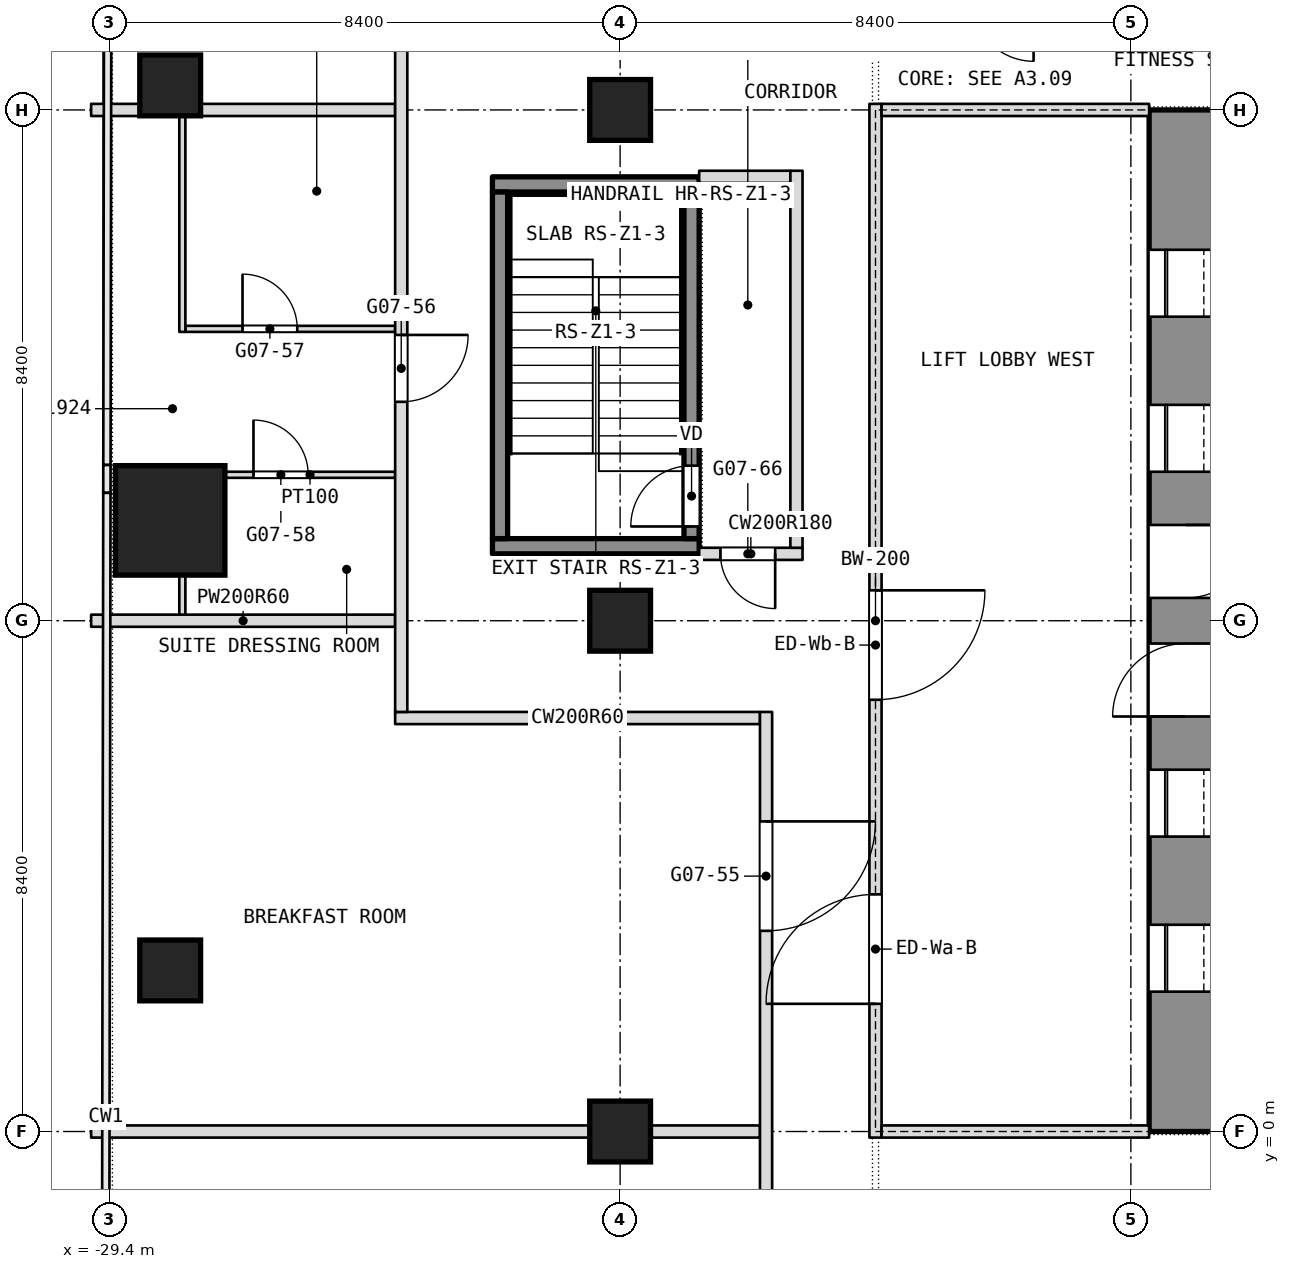
"""IFC4 building model, lengths in metres.
Left out: names, types, materials, properties, quantities, classifications, styles, units other than length and angle.
Written with IfcOpenShell. Run it as: python <this file> out.ifc"""

import sys

from ifc_helpers import new_model, si_unit, direction, frame, frame_2d, origin, origin_2d, place, context, subcontext, project, spatial, rectangle, extrude, element, fill, save


model = new_model("IFC4")
c1 = context("Model", 3, precision=1e-05, world=origin(), true_north=direction((0.0, 1.0)))
c2 = subcontext(c1, "Body", "Model", "MODEL_VIEW")
j1 = project(units=[si_unit("LENGTHUNIT", "METRE"), si_unit("PLANEANGLEUNIT", "RADIAN")], contexts=[c1])
p1 = place(None, origin())
s1 = spatial("IfcSite", under=j1, at=p1, CompositionType="ELEMENT")
p2 = place(p1, origin())
s2 = spatial("IfcBuilding", under=s1, at=p2, CompositionType="ELEMENT")
p3 = place(p2, frame((0.0, 0.0, 83.3)))
s3 = spatial("IfcBuildingStorey", under=s2, at=p3, CompositionType="ELEMENT", Elevation=83.3)
p4 = place(p3, frame((-11.7, 0.0, 0.0), z_axis=(0.0, 0.0, 1.0), x_axis=(0.0, 1.0, 0.0)))
e1 = element("IfcWall", 1, at=p4, inside=s3, PredefinedType="SHEAR", context=c2, shape_type="SweptSolid", body=[
    extrude(rectangle(XDim=16.8, YDim=1.2, at=frame_2d((8.4, 0.0))), origin(), (0.0, 0.0, 1.0), 3.6),
])
p5 = place(p4, frame((2.3, 0.0, 0.0)))
e2 = element("IfcOpeningElement", 2, at=p5, cuts=e1, PredefinedType="OPENING", context=c2, shape_type="SweptSolid", body=[
    extrude(rectangle(XDim=1.1, YDim=2.1, at=frame_2d((0.55, 1.05))), frame((0.0, 0.6, 0.0), z_axis=(0.0, -1.0, 0.0), x_axis=(1.0, 0.0, 0.0)), (0.0, 0.0, 1.0), 1.2),
])
p6 = place(p4, frame((4.85, 0.0, 0.0)))
e3 = element("IfcOpeningElement", 3, at=p6, cuts=e1, PredefinedType="OPENING", context=c2, shape_type="SweptSolid", body=[
    extrude(rectangle(XDim=1.1, YDim=2.1, at=frame_2d((0.55, 1.05))), frame((0.0, 0.6, 0.0), z_axis=(0.0, -1.0, 0.0), x_axis=(1.0, 0.0, 0.0)), (0.0, 0.0, 1.0), 1.2),
])
p7 = place(p4, frame((6.825, 0.0, 0.0)))
e4 = element("IfcOpeningElement", 4, at=p7, cuts=e1, PredefinedType="OPENING", context=c2, shape_type="SweptSolid", body=[
    extrude(rectangle(XDim=1.2, YDim=2.1, at=frame_2d((0.6, 1.05))), frame((0.0, 0.6, 0.0), z_axis=(0.0, -1.0, 0.0), x_axis=(1.0, 0.0, 0.0)), (0.0, 0.0, 1.0), 1.2),
])
p8 = place(p4, frame((13.4, 0.0, 0.0)))
e5 = element("IfcOpeningElement", 5, at=p8, cuts=e1, PredefinedType="OPENING", context=c2, shape_type="SweptSolid", body=[
    extrude(rectangle(XDim=1.1, YDim=2.1, at=frame_2d((0.55, 1.05))), frame((0.0, 0.6, 0.0), z_axis=(0.0, -1.0, 0.0), x_axis=(1.0, 0.0, 0.0)), (0.0, 0.0, 1.0), 1.2),
])
p9 = place(p4, frame((10.85, 0.0, 0.0)))
e6 = element("IfcOpeningElement", 6, at=p9, cuts=e1, PredefinedType="OPENING", context=c2, shape_type="SweptSolid", body=[
    extrude(rectangle(XDim=1.1, YDim=2.1, at=frame_2d((0.55, 1.05))), frame((0.0, 0.6, 0.0), z_axis=(0.0, -1.0, 0.0), x_axis=(1.0, 0.0, 0.0)), (0.0, 0.0, 1.0), 1.2),
])
p10 = place(p4, frame((8.775, 0.0, 0.0)))
e7 = element("IfcOpeningElement", 7, at=p10, cuts=e1, PredefinedType="OPENING", context=c2, shape_type="SweptSolid", body=[
    extrude(rectangle(XDim=1.2, YDim=2.1, at=frame_2d((0.6, 1.05))), frame((0.0, 0.6, 0.0), z_axis=(0.0, -1.0, 0.0), x_axis=(1.0, 0.0, 0.0)), (0.0, 0.0, 1.0), 1.2),
])
p11 = place(p3, frame((-28.4, 10.05, 0.0), z_axis=(0.0, 0.0, 1.0), x_axis=(1.0, 0.0, 0.0)))
e8 = element("IfcColumn", 8, at=p11, inside=s3, PredefinedType="COLUMN", context=c2, shape_type="SweptSolid", body=[
    extrude(rectangle(XDim=1.8, YDim=1.8, at=origin_2d()), origin(), (0.0, 0.0, 1.0), 3.6),
])
for number, where, z_axis, x_axis in (
    (9, (-21.0, 0.0, 0.0), (0.0, 0.0, 1.0), (1.0, 0.0, 0.0)),
    (10, (-21.0, 8.4, 0.0), (0.0, 0.0, 1.0), (1.0, 0.0, 0.0)),
    (11, (-21.0, 16.8, 0.0), (0.0, 0.0, 1.0), (1.0, 0.0, 0.0)),
    (12, (-28.4, 2.649, 0.0), (0.0, 0.0, 1.0), (1.0, 0.0, 0.0)),
    (13, (-28.4, 17.203, 0.0), (0.0, 0.0, 1.0), (1.0, 0.0, 0.0)),
):
    element("IfcColumn", number, at=place(p3, frame(where, z_axis=z_axis, x_axis=x_axis)), inside=s3, PredefinedType="COLUMN", context=c2, shape_type="SweptSolid", body=[
        extrude(rectangle(XDim=1.0, YDim=1.0, at=origin_2d()), origin(), (0.0, 0.0, 1.0), 3.6),
    ])
p12 = place(p3, frame((-29.7, 0.0, 0.0), z_axis=(0.0, 0.0, 1.0), x_axis=(1.0, 0.0, 0.0)))
e14 = element("IfcWall", 14, at=p12, inside=s3, PredefinedType="PARTITIONING", context=c2, shape_type="SweptSolid", body=[
    extrude(rectangle(XDim=11.0, YDim=0.2, at=frame_2d((5.5, 0.0))), origin(), (0.0, 0.0, 1.0), 2.8),
])
p13 = place(p3, frame((-24.7, 6.8, 0.0), z_axis=(0.0, 0.0, 1.0), x_axis=(1.0, 0.0, 0.0)))
e15 = element("IfcWall", 15, at=p13, inside=s3, PredefinedType="PARTITIONING", context=c2, shape_type="SweptSolid", body=[
    extrude(rectangle(XDim=6.0, YDim=0.2, at=frame_2d((3.0, 0.0))), origin(), (0.0, 0.0, 1.0), 3.3),
])
p14 = place(p3, frame((-29.7, 8.4, 0.0), z_axis=(0.0, 0.0, 1.0), x_axis=(1.0, 0.0, 0.0)))
e16 = element("IfcWall", 16, at=p14, inside=s3, PredefinedType="PARTITIONING", context=c2, shape_type="SweptSolid", body=[
    extrude(rectangle(XDim=5.0, YDim=0.2, at=frame_2d((2.5, 0.0))), origin(), (0.0, 0.0, 1.0), 2.8),
])
p15 = place(p3, frame((-19.7, 9.5, 0.0), z_axis=(0.0, 0.0, 1.0), x_axis=(1.0, 0.0, 0.0)))
e17 = element("IfcWall", 17, at=p15, inside=s3, PredefinedType="PARTITIONING", context=c2, shape_type="SweptSolid", body=[
    extrude(rectangle(XDim=1.7, YDim=0.2, at=frame_2d((0.85, 0.0))), origin(), (0.0, 0.0, 1.0), 3.3),
])
p16 = place(p15, frame((0.35, 0.0, 0.0)))
e18 = element("IfcOpeningElement", 18, at=p16, cuts=e17, PredefinedType="OPENING", context=c2, shape_type="SweptSolid", body=[
    extrude(rectangle(XDim=0.9, YDim=2.1, at=frame_2d((0.45, 1.05))), frame((0.0, 0.1, 0.0), z_axis=(0.0, -1.0, 0.0), x_axis=(1.0, 0.0, 0.0)), (0.0, 0.0, 1.0), 0.2),
])
p17 = place(p3, frame((-27.5, 10.8, 0.0), z_axis=(0.0, 0.0, 1.0), x_axis=(1.0, 0.0, 0.0)))
e19 = element("IfcWall", 19, at=p17, inside=s3, PredefinedType="PARTITIONING", context=c2, shape_type="SweptSolid", body=[
    extrude(rectangle(XDim=2.8, YDim=0.1, at=frame_2d((1.4, 0.0))), origin(), (0.0, 0.0, 1.0), 3.3),
])
p18 = place(p17, frame((0.47, 0.0, 0.0)))
e20 = element("IfcOpeningElement", 20, at=p18, cuts=e19, PredefinedType="OPENING", context=c2, shape_type="SweptSolid", body=[
    extrude(rectangle(XDim=0.9, YDim=2.1, at=frame_2d((0.45, 1.05))), frame((0.0, 0.05, 0.0), z_axis=(0.0, -1.0, 0.0), x_axis=(1.0, 0.0, 0.0)), (0.0, 0.0, 1.0), 0.1),
])
p19 = place(p3, frame((-28.15, 13.2, 0.0), z_axis=(0.0, 0.0, 1.0), x_axis=(1.0, 0.0, 0.0)))
e21 = element("IfcWall", 21, at=p19, inside=s3, PredefinedType="PARTITIONING", context=c2, shape_type="SweptSolid", body=[
    extrude(rectangle(XDim=3.45, YDim=0.1, at=frame_2d((1.725, 0.0))), origin(), (0.0, 0.0, 1.0), 3.3),
])
p20 = place(p19, frame((0.94, 0.0, 0.0)))
e22 = element("IfcOpeningElement", 22, at=p20, cuts=e21, PredefinedType="OPENING", context=c2, shape_type="SweptSolid", body=[
    extrude(rectangle(XDim=0.9, YDim=2.1, at=frame_2d((0.45, 1.05))), frame((0.0, 0.05, 0.0), z_axis=(0.0, -1.0, 0.0), x_axis=(1.0, 0.0, 0.0)), (0.0, 0.0, 1.0), 0.1),
])
p21 = place(p3, frame((-19.7, 15.7, 0.0), z_axis=(0.0, 0.0, 1.0), x_axis=(1.0, 0.0, 0.0)))
e23 = element("IfcWall", 23, at=p21, inside=s3, PredefinedType="PARTITIONING", context=c2, shape_type="SweptSolid", body=[
    extrude(rectangle(XDim=1.5, YDim=0.2, at=frame_2d((0.75, 0.0))), origin(), (0.0, 0.0, 1.0), 3.3),
])
p22 = place(p3, frame((-29.7, 16.8, 0.0), z_axis=(0.0, 0.0, 1.0), x_axis=(1.0, 0.0, 0.0)))
e24 = element("IfcWall", 24, at=p22, inside=s3, PredefinedType="PARTITIONING", context=c2, shape_type="SweptSolid", body=[
    extrude(rectangle(XDim=5.0, YDim=0.2, at=frame_2d((2.5, 0.0))), origin(), (0.0, 0.0, 1.0), 2.8),
])
p23 = place(p3, frame((-18.1, 9.6, 0.0), z_axis=(0.0, 0.0, 1.0), x_axis=(0.0, 1.0, 0.0)))
e25 = element("IfcWall", 25, at=p23, inside=s3, PredefinedType="PARTITIONING", context=c2, shape_type="SweptSolid", body=[
    extrude(rectangle(XDim=6.2, YDim=0.2, at=frame_2d((3.1, 0.0))), origin(), (0.0, 0.0, 1.0), 3.3),
])
p24 = place(p3, frame((-18.6, -16.665, 0.0), z_axis=(0.0, 0.0, 1.0), x_axis=(0.0, 1.0, 0.0)))
e26 = element("IfcWall", 26, at=p24, inside=s3, PredefinedType="PARTITIONING", context=c2, shape_type="SweptSolid", body=[
    extrude(rectangle(XDim=23.565, YDim=0.2, at=frame_2d((11.782, 0.0))), origin(), (0.0, 0.0, 1.0), 3.3),
])
p25 = place(p24, frame((4.0, 0.0, 0.0)))
e27 = element("IfcOpeningElement", 27, at=p25, cuts=e26, PredefinedType="OPENING", context=c2, shape_type="SweptSolid", body=[
    extrude(rectangle(XDim=1.1, YDim=2.1, at=frame_2d((0.55, 1.05))), frame((0.0, 0.1, 0.0), z_axis=(0.0, -1.0, 0.0), x_axis=(1.0, 0.0, 0.0)), (0.0, 0.0, 1.0), 0.2),
])
p26 = place(p24, frame((11.565, 0.0, 0.0)))
e28 = element("IfcOpeningElement", 28, at=p26, cuts=e26, PredefinedType="OPENING", context=c2, shape_type="SweptSolid", body=[
    extrude(rectangle(XDim=1.8, YDim=2.1, at=frame_2d((0.9, 1.05))), frame((0.0, 0.1, 0.0), z_axis=(0.0, -1.0, 0.0), x_axis=(1.0, 0.0, 0.0)), (0.0, 0.0, 1.0), 0.2),
])
p27 = place(p24, frame((19.965, 0.0, 0.0)))
e29 = element("IfcOpeningElement", 29, at=p27, cuts=e26, PredefinedType="OPENING", context=c2, shape_type="SweptSolid", body=[
    extrude(rectangle(XDim=1.8, YDim=2.1, at=frame_2d((0.9, 1.05))), frame((0.0, 0.1, 0.0), z_axis=(0.0, -1.0, 0.0), x_axis=(1.0, 0.0, 0.0)), (0.0, 0.0, 1.0), 0.2),
])
p28 = place(p3, frame((-24.6, 6.9, 0.0), z_axis=(0.0, 0.0, 1.0), x_axis=(0.0, 1.0, 0.0)))
e30 = element("IfcWall", 30, at=p28, inside=s3, PredefinedType="PARTITIONING", context=c2, shape_type="SweptSolid", body=[
    extrude(rectangle(XDim=11.6, YDim=0.2, at=frame_2d((5.8, 0.0))), origin(), (0.0, 0.0, 1.0), 3.3),
])
p29 = place(p28, frame((5.1, 0.0, 0.0)))
e31 = element("IfcOpeningElement", 31, at=p29, cuts=e30, PredefinedType="OPENING", context=c2, shape_type="SweptSolid", body=[
    extrude(rectangle(XDim=1.1, YDim=2.1, at=frame_2d((0.55, 1.05))), frame((0.0, 0.1, 0.0), z_axis=(0.0, -1.0, 0.0), x_axis=(1.0, 0.0, 0.0)), (0.0, 0.0, 1.0), 0.2),
])
p30 = place(p3, frame((-28.2, 8.5, 0.0), z_axis=(0.0, 0.0, 1.0), x_axis=(0.0, 1.0, 0.0)))
e32 = element("IfcWall", 32, at=p30, inside=s3, PredefinedType="PARTITIONING", context=c2, shape_type="SweptSolid", body=[
    extrude(rectangle(XDim=0.65, YDim=0.1, at=frame_2d((0.325, 0.0))), origin(), (0.0, 0.0, 1.0), 2.486),
])
p31 = place(p3, frame((-28.2, 13.15, 0.0), z_axis=(0.0, 0.0, 1.0), x_axis=(0.0, 1.0, 0.0)))
e33 = element("IfcWall", 33, at=p31, inside=s3, PredefinedType="PARTITIONING", context=c2, shape_type="SweptSolid", body=[
    extrude(rectangle(XDim=3.75, YDim=0.1, at=frame_2d((1.875, 0.0))), origin(), (0.0, 0.0, 1.0), 2.486),
])
p32 = place(p3, frame((-16.8, -0.1, 0.0), z_axis=(0.0, 0.0, 1.0), x_axis=(0.0, 1.0, 0.0)))
e34 = element("IfcWall", 34, at=p32, inside=s3, PredefinedType="PARTITIONING", context=c2, shape_type="SweptSolid", body=[
    extrude(rectangle(XDim=17.0, YDim=0.2, at=frame_2d((8.5, 0.0))), origin(), (0.0, 0.0, 1.0), 3.3),
])
p33 = place(p32, frame((2.2, 0.0, 0.0)))
e35 = element("IfcOpeningElement", 35, at=p33, cuts=e34, PredefinedType="OPENING", context=c2, shape_type="SweptSolid", body=[
    extrude(rectangle(XDim=1.8, YDim=2.1, at=frame_2d((0.9, 1.05))), frame((0.0, 0.1, 0.0), z_axis=(0.0, -1.0, 0.0), x_axis=(1.0, 0.0, 0.0)), (0.0, 0.0, 1.0), 0.2),
])
p34 = place(p32, frame((7.2, 0.0, 0.0)))
e36 = element("IfcOpeningElement", 36, at=p34, cuts=e34, PredefinedType="OPENING", context=c2, shape_type="SweptSolid", body=[
    extrude(rectangle(XDim=1.8, YDim=2.1, at=frame_2d((0.9, 1.05))), frame((0.0, 0.1, 0.0), z_axis=(0.0, -1.0, 0.0), x_axis=(1.0, 0.0, 0.0)), (0.0, 0.0, 1.0), 0.2),
])
for number, where, z_axis, x_axis in (
    (37, (-16.7, 0.0, 0.0), (0.0, 0.0, 1.0), (1.0, 0.0, 0.0)),
    (38, (-16.7, 16.8, 0.0), (0.0, 0.0, 1.0), (1.0, 0.0, 0.0)),
):
    element("IfcWall", number, at=place(p3, frame(where, z_axis=z_axis, x_axis=x_axis)), inside=s3, PredefinedType="PARTITIONING", context=c2, shape_type="SweptSolid", body=[
        extrude(rectangle(XDim=4.4, YDim=0.2, at=frame_2d((2.2, 0.0))), origin(), (0.0, 0.0, 1.0), 2.8),
    ])
for number, where, z_axis, x_axis in (
    (39, (-23.1, 9.625, 0.1), (0.0, 0.0, 1.0), (1.0, 0.0, 0.0)),
    (40, (-23.1, 15.575, 0.1), (0.0, 0.0, 1.0), (1.0, 0.0, 0.0)),
):
    element("IfcWall", number, at=place(p3, frame(where, z_axis=z_axis, x_axis=x_axis)), inside=s3, PredefinedType="SHEAR", context=c2, shape_type="SweptSolid", body=[
        extrude(rectangle(XDim=3.4, YDim=0.25, at=frame_2d((1.7, 0.0))), origin(), (0.0, 0.0, 1.0), 3.6),
    ])
p35 = place(p3, frame((-22.975, 9.75, 0.1), z_axis=(0.0, 0.0, 1.0), x_axis=(0.0, 1.0, 0.0)))
e41 = element("IfcWall", 41, at=p35, inside=s3, PredefinedType="SHEAR", context=c2, shape_type="SweptSolid", body=[
    extrude(rectangle(XDim=5.7, YDim=0.25, at=frame_2d((2.85, 0.0))), origin(), (0.0, 0.0, 1.0), 3.6),
])
p36 = place(p3, frame((-19.825, 9.75, 0.1), z_axis=(0.0, 0.0, 1.0), x_axis=(0.0, 1.0, 0.0)))
e42 = element("IfcWall", 42, at=p36, inside=s3, PredefinedType="SHEAR", context=c2, shape_type="SweptSolid", body=[
    extrude(rectangle(XDim=5.7, YDim=0.25, at=frame_2d((2.85, 0.0))), origin(), (0.0, 0.0, 1.0), 3.6),
])
p37 = place(p36, frame((0.2, 0.0, 0.0)))
e43 = element("IfcOpeningElement", 43, at=p37, cuts=e42, PredefinedType="OPENING", context=c2, shape_type="SweptSolid", body=[
    extrude(rectangle(XDim=1.0, YDim=2.1, at=frame_2d((0.5, 1.05))), frame((0.0, 0.125, 0.0), z_axis=(0.0, -1.0, 0.0), x_axis=(1.0, 0.0, 0.0)), (0.0, 0.0, 1.0), 0.25),
])
p38 = place(p16, origin())
e44 = element("IfcDoor", 44, at=p38, inside=s3, OperationType="SINGLE_SWING_RIGHT", PredefinedType="DOOR", context=c2, shape_type="SweptSolid", body=[
    extrude(rectangle(XDim=0.9, YDim=2.1, at=frame_2d((0.45, 1.05))), frame((0.0, 0.025, 0.0), z_axis=(0.0, -1.0, 0.0), x_axis=(1.0, 0.0, 0.0)), (0.0, 0.0, 1.0), 0.05),
])
fill(e18, e44)
p39 = place(p18, origin())
e45 = element("IfcDoor", 45, at=p39, inside=s3, OperationType="SINGLE_SWING_RIGHT", PredefinedType="DOOR", context=c2, shape_type="SweptSolid", body=[
    extrude(rectangle(XDim=0.9, YDim=2.1, at=frame_2d((0.45, 1.05))), frame((0.0, 0.025, 0.0), z_axis=(0.0, -1.0, 0.0), x_axis=(1.0, 0.0, 0.0)), (0.0, 0.0, 1.0), 0.05),
])
fill(e20, e45)
p40 = place(p20, origin())
e46 = element("IfcDoor", 46, at=p40, inside=s3, OperationType="SINGLE_SWING_LEFT", PredefinedType="DOOR", context=c2, shape_type="SweptSolid", body=[
    extrude(rectangle(XDim=0.9, YDim=2.1, at=frame_2d((0.45, 1.05))), frame((0.0, 0.025, 0.0), z_axis=(0.0, -1.0, 0.0), x_axis=(1.0, 0.0, 0.0)), (0.0, 0.0, 1.0), 0.05),
])
fill(e22, e46)
p41 = place(p27, origin())
e47 = element("IfcDoor", 47, at=p41, inside=s3, OperationType="DOUBLE_DOOR_SINGLE_SWING", PredefinedType="DOOR", context=c2, shape_type="SweptSolid", body=[
    extrude(rectangle(XDim=1.8, YDim=2.1, at=frame_2d((0.9, 1.05))), frame((0.0, 0.025, 0.0), z_axis=(0.0, -1.0, 0.0), x_axis=(1.0, 0.0, 0.0)), (0.0, 0.0, 1.0), 0.05),
])
fill(e29, e47)
p42 = place(p29, origin())
e48 = element("IfcDoor", 48, at=p42, inside=s3, OperationType="SINGLE_SWING_RIGHT", PredefinedType="DOOR", context=c2, shape_type="SweptSolid", body=[
    extrude(rectangle(XDim=1.1, YDim=2.1, at=frame_2d((0.55, 1.05))), frame((0.0, 0.025, 0.0), z_axis=(0.0, -1.0, 0.0), x_axis=(1.0, 0.0, 0.0)), (0.0, 0.0, 1.0), 0.05),
])
fill(e31, e48)
p43 = place(p37, origin())
e49 = element("IfcDoor", 49, at=p43, inside=s3, OperationType="SINGLE_SWING_LEFT", PredefinedType="DOOR", context=c2, shape_type="SweptSolid", body=[
    extrude(rectangle(XDim=1.0, YDim=2.1, at=frame_2d((0.5, 1.05))), frame((0.0, 0.025, 0.0), z_axis=(0.0, -1.0, 0.0), x_axis=(1.0, 0.0, 0.0)), (0.0, 0.0, 1.0), 0.05),
])
fill(e43, e49)
p44 = place(p5, origin())
e50 = element("IfcDoor", 50, at=p44, inside=s3, OperationType="SLIDING_TO_LEFT", PredefinedType="DOOR", context=c2, shape_type="SweptSolid", body=[
    extrude(rectangle(XDim=1.1, YDim=2.1, at=frame_2d((0.55, 1.05))), frame((0.0, 0.025, 0.0), z_axis=(0.0, -1.0, 0.0), x_axis=(1.0, 0.0, 0.0)), (0.0, 0.0, 1.0), 0.05),
])
fill(e2, e50)
p45 = place(p6, origin())
e51 = element("IfcDoor", 51, at=p45, inside=s3, OperationType="SLIDING_TO_LEFT", PredefinedType="DOOR", context=c2, shape_type="SweptSolid", body=[
    extrude(rectangle(XDim=1.1, YDim=2.1, at=frame_2d((0.55, 1.05))), frame((0.0, 0.025, 0.0), z_axis=(0.0, -1.0, 0.0), x_axis=(1.0, 0.0, 0.0)), (0.0, 0.0, 1.0), 0.05),
])
fill(e3, e51)
p46 = place(p7, origin())
e52 = element("IfcDoor", 52, at=p46, inside=s3, OperationType="SINGLE_SWING_LEFT", PredefinedType="DOOR", context=c2, shape_type="SweptSolid", body=[
    extrude(rectangle(XDim=1.2, YDim=2.1, at=frame_2d((0.6, 1.05))), frame((0.0, 0.025, 0.0), z_axis=(0.0, -1.0, 0.0), x_axis=(1.0, 0.0, 0.0)), (0.0, 0.0, 1.0), 0.05),
])
fill(e4, e52)
p47 = place(p8, origin())
e53 = element("IfcDoor", 53, at=p47, inside=s3, OperationType="SLIDING_TO_LEFT", PredefinedType="DOOR", context=c2, shape_type="SweptSolid", body=[
    extrude(rectangle(XDim=1.1, YDim=2.1, at=frame_2d((0.55, 1.05))), frame((0.0, 0.025, 0.0), z_axis=(0.0, -1.0, 0.0), x_axis=(1.0, 0.0, 0.0)), (0.0, 0.0, 1.0), 0.05),
])
fill(e5, e53)
p48 = place(p9, origin())
e54 = element("IfcDoor", 54, at=p48, inside=s3, OperationType="SLIDING_TO_LEFT", PredefinedType="DOOR", context=c2, shape_type="SweptSolid", body=[
    extrude(rectangle(XDim=1.1, YDim=2.1, at=frame_2d((0.55, 1.05))), frame((0.0, 0.025, 0.0), z_axis=(0.0, -1.0, 0.0), x_axis=(1.0, 0.0, 0.0)), (0.0, 0.0, 1.0), 0.05),
])
fill(e6, e54)
p49 = place(p10, origin())
e55 = element("IfcDoor", 55, at=p49, inside=s3, OperationType="SINGLE_SWING_LEFT", PredefinedType="DOOR", context=c2, shape_type="SweptSolid", body=[
    extrude(rectangle(XDim=1.2, YDim=2.1, at=frame_2d((0.6, 1.05))), frame((0.0, 0.025, 0.0), z_axis=(0.0, -1.0, 0.0), x_axis=(1.0, 0.0, 0.0)), (0.0, 0.0, 1.0), 0.05),
])
fill(e7, e55)
p50 = place(p33, origin())
e56 = element("IfcDoor", 56, at=p50, inside=s3, OperationType="DOUBLE_DOOR_SINGLE_SWING", PredefinedType="DOOR", context=c2, shape_type="SweptSolid", body=[
    extrude(rectangle(XDim=1.8, YDim=2.1, at=frame_2d((0.9, 1.05))), frame((0.0, 0.025, 0.0), z_axis=(0.0, -1.0, 0.0), x_axis=(1.0, 0.0, 0.0)), (0.0, 0.0, 1.0), 0.05),
])
fill(e35, e56)
p51 = place(p34, origin())
e57 = element("IfcDoor", 57, at=p51, inside=s3, OperationType="DOUBLE_DOOR_SINGLE_SWING", PredefinedType="DOOR", context=c2, shape_type="SweptSolid", body=[
    extrude(rectangle(XDim=1.8, YDim=2.1, at=frame_2d((0.9, 1.05))), frame((0.0, 0.025, 0.0), z_axis=(0.0, -1.0, 0.0), x_axis=(1.0, 0.0, 0.0)), (0.0, 0.0, 1.0), 0.05),
])
fill(e36, e57)
save(model, sys.argv[1])
